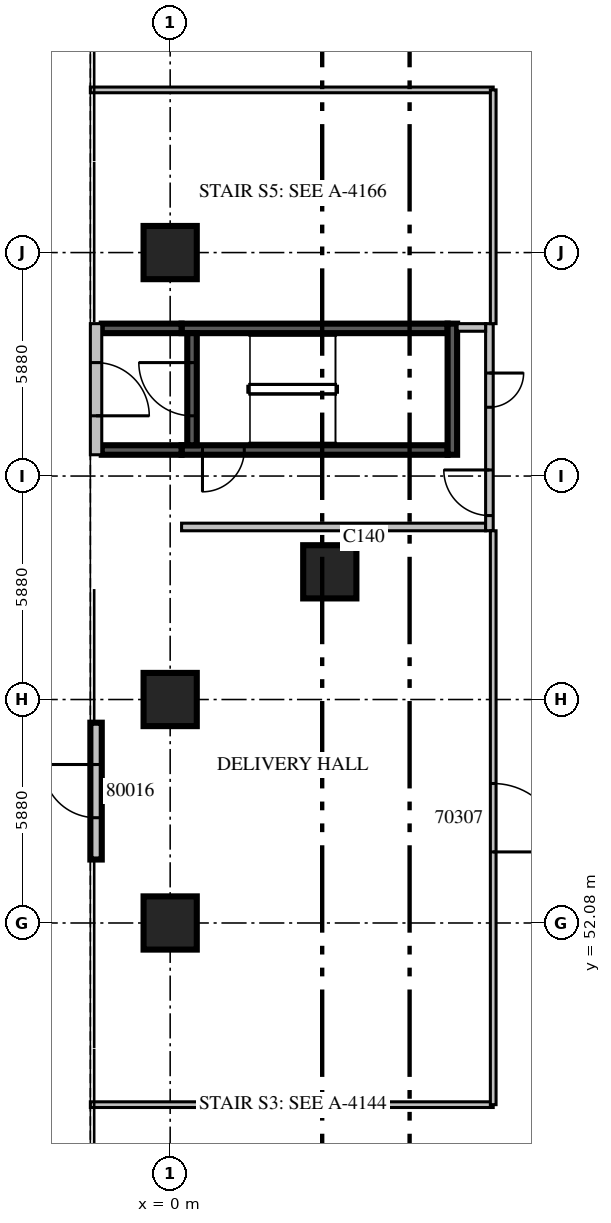
"""IFC4 building model, lengths in metres.
Left out: names, types, materials, properties, quantities, classifications, styles, units other than length and angle.
Written with IfcOpenShell. Run it as: python <this file> out.ifc"""

import sys

from ifc_helpers import new_model, si_unit, direction, frame, frame_2d, origin, origin_2d, place, context, subcontext, project, spatial, rectangle, extrude, source, transform, mapped, element, fill, save


model = new_model("IFC4")
c1 = context("Model", 3, precision=1e-05, world=origin(), true_north=direction((0.0, 1.0)))
c2 = subcontext(c1, "Body", "Model", "MODEL_VIEW")
j1 = project(units=[si_unit("LENGTHUNIT", "METRE"), si_unit("PLANEANGLEUNIT", "RADIAN")], contexts=[c1])
p1 = place(None, origin())
s1 = spatial("IfcSite", under=j1, at=p1, CompositionType="ELEMENT")
p2 = place(p1, origin())
s2 = spatial("IfcBuilding", under=s1, at=p2, CompositionType="ELEMENT")
p3 = place(p2, origin())
s3 = spatial("IfcBuildingStorey", under=s2, at=p3, CompositionType="ELEMENT", Elevation=0.0)
m1 = source(origin(), c2, "Body", "SweptSolid", [
    extrude(rectangle(XDim=1.4, YDim=1.4, at=origin_2d()), origin(), (0.0, 0.0, 1.0), 7.5),
])
for number, where, z_axis, x_axis in (
    (1, (0.0, 52.08, 0.0), (0.0, 0.0, 1.0), (1.0, 0.0, 0.0)),
    (2, (0.0, 57.96, 0.0), (0.0, 0.0, 1.0), (1.0, 0.0, 0.0)),
    (3, (0.0, 69.72, 0.0), (0.0, 0.0, 1.0), (1.0, 0.0, 0.0)),
    (4, (4.2, 61.32, 0.0), (0.0, 0.0, 1.0), (1.0, 0.0, 0.0)),
):
    element("IfcColumn", number, at=place(p3, frame(where, z_axis=z_axis, x_axis=x_axis)), inside=s3, PredefinedType="COLUMN", context=c2, shape_type="MappedRepresentation", body=[
        mapped(m1, transform((0.0, 0.0, 0.0), scale=1.0)),
    ])
m2 = source(origin(), c2, "Body", "SweptSolid", [
    extrude(rectangle(XDim=3.6, YDim=0.3, at=frame_2d((1.8, 0.0))), origin(), (0.0, 0.0, 1.0), 6.9),
])
p4 = place(p3, frame((-1.95, 57.35, 0.0), z_axis=(0.0, 0.0, 1.0), x_axis=(0.0, -1.0, 0.0)))
e5 = element("IfcWall", 5, at=p4, inside=s3, PredefinedType="STANDARD", context=c2, shape_type="MappedRepresentation", body=[
    mapped(m2, transform((0.0, 0.0, 0.0), scale=1.0)),
])
m3 = source(origin(), c2, "Body", "SweptSolid", [
    extrude(rectangle(XDim=1.4, YDim=2.4, at=frame_2d((0.7, 1.2))), frame((0.0, 0.16, 0.0), z_axis=(0.0, -1.0, 0.0), x_axis=(1.0, 0.0, 0.0)), (0.0, 0.0, 1.0), 0.32),
])
p5 = place(p4, frame((1.1, 0.0, 0.0)))
e6 = element("IfcOpeningElement", 6, at=p5, cuts=e5, PredefinedType="OPENING", context=c2, shape_type="MappedRepresentation", body=[
    mapped(m3, transform((0.0, 0.0, 0.0), scale=1.0)),
])
m4 = source(origin(), c2, "Body", "SweptSolid", [
    extrude(rectangle(XDim=7.0, YDim=0.25, at=frame_2d((3.5, 0.0))), origin(), (0.0, 0.0, 1.0), 6.9),
])
p6 = place(p3, frame((0.3, 64.525, 0.0), z_axis=(0.0, 0.0, 1.0), x_axis=(1.0, 0.0, 0.0)))
e7 = element("IfcWall", 7, at=p6, inside=s3, PredefinedType="SOLIDWALL", context=c2, shape_type="MappedRepresentation", body=[
    mapped(m4, transform((0.0, 0.0, 0.0), scale=1.0)),
])
m5 = source(origin(), c2, "Body", "SweptSolid", [
    extrude(rectangle(XDim=1.1, YDim=2.1, at=frame_2d((0.55, 1.05))), frame((0.0, 0.135, 0.0), z_axis=(0.0, -1.0, 0.0), x_axis=(1.0, 0.0, 0.0)), (0.0, 0.0, 1.0), 0.27),
])
p7 = place(p6, frame((0.55, 0.0, 0.0)))
e8 = element("IfcOpeningElement", 8, at=p7, cuts=e7, PredefinedType="OPENING", context=c2, shape_type="MappedRepresentation", body=[
    mapped(m5, transform((0.0, 0.0, 0.0), scale=1.0)),
])
p8 = place(p3, frame((0.3, 67.725, 0.0), z_axis=(0.0, 0.0, 1.0), x_axis=(1.0, 0.0, 0.0)))
e9 = element("IfcWall", 9, at=p8, inside=s3, PredefinedType="SOLIDWALL", context=c2, shape_type="MappedRepresentation", body=[
    mapped(m4, transform((0.0, 0.0, 0.0), scale=1.0)),
])
m6 = source(origin(), c2, "Body", "SweptSolid", [
    extrude(rectangle(XDim=3.45, YDim=0.25, at=frame_2d((1.725, 0.0))), origin(), (0.0, 0.0, 1.0), 6.9),
])
p9 = place(p3, frame((7.425, 64.4, 0.0), z_axis=(0.0, 0.0, 1.0), x_axis=(0.0, 1.0, 0.0)))
e10 = element("IfcWall", 10, at=p9, inside=s3, PredefinedType="SOLIDWALL", context=c2, shape_type="MappedRepresentation", body=[
    mapped(m6, transform((0.0, 0.0, 0.0), scale=1.0)),
])
m7 = source(origin(), c2, "Body", "SweptSolid", [
    extrude(rectangle(XDim=2.95, YDim=0.25, at=frame_2d((1.475, 0.0))), origin(), (0.0, 0.0, 1.0), 6.9),
])
p10 = place(p3, frame((0.575, 67.6, 0.0), z_axis=(0.0, 0.0, 1.0), x_axis=(0.0, -1.0, 0.0)))
e11 = element("IfcWall", 11, at=p10, inside=s3, PredefinedType="SOLIDWALL", context=c2, shape_type="MappedRepresentation", body=[
    mapped(m7, transform((0.0, 0.0, 0.0), scale=1.0)),
])
m8 = source(origin(), c2, "Body", "SweptSolid", [
    extrude(rectangle(XDim=1.4, YDim=2.1, at=frame_2d((0.7, 1.05))), frame((0.0, 0.135, 0.0), z_axis=(0.0, -1.0, 0.0), x_axis=(1.0, 0.0, 0.0)), (0.0, 0.0, 1.0), 0.27),
])
p11 = place(p10, frame((0.775, 0.0, 0.0)))
e12 = element("IfcOpeningElement", 12, at=p11, cuts=e11, PredefinedType="OPENING", context=c2, shape_type="MappedRepresentation", body=[
    mapped(m8, transform((0.0, 0.0, 0.0), scale=1.0)),
])
m9 = source(origin(), c2, "Body", "SweptSolid", [
    extrude(rectangle(XDim=8.0, YDim=0.2, at=frame_2d((4.0, 0.0))), origin(), (0.0, 0.0, 1.0), 6.9),
])
p12 = place(p3, frame((0.3, 62.5, 0.0), z_axis=(0.0, 0.0, 1.0), x_axis=(1.0, 0.0, 0.0)))
e13 = element("IfcWall", 13, at=p12, inside=s3, PredefinedType="PARTITIONING", context=c2, shape_type="MappedRepresentation", body=[
    mapped(m9, transform((0.0, 0.0, 0.0), scale=1.0)),
])
m10 = source(origin(), c2, "Body", "SweptSolid", [
    extrude(rectangle(XDim=5.45, YDim=0.2, at=frame_2d((2.725, 0.0))), origin(), (0.0, 0.0, 1.0), 6.9),
])
p13 = place(p3, frame((8.4, 67.85, 0.0), z_axis=(0.0, 0.0, 1.0), x_axis=(0.0, -1.0, 0.0)))
e14 = element("IfcWall", 14, at=p13, inside=s3, PredefinedType="PARTITIONING", context=c2, shape_type="MappedRepresentation", body=[
    mapped(m10, transform((0.0, 0.0, 0.0), scale=1.0)),
])
m11 = source(origin(), c2, "Body", "SweptSolid", [
    extrude(rectangle(XDim=1.2, YDim=2.1, at=frame_2d((0.6, 1.05))), frame((0.0, 0.11, 0.0), z_axis=(0.0, -1.0, 0.0), x_axis=(1.0, 0.0, 0.0)), (0.0, 0.0, 1.0), 0.22),
])
p14 = place(p13, frame((3.85, 0.0, 0.0)))
e15 = element("IfcOpeningElement", 15, at=p14, cuts=e14, PredefinedType="OPENING", context=c2, shape_type="MappedRepresentation", body=[
    mapped(m11, transform((0.0, 0.0, 0.0), scale=1.0)),
])
m12 = source(origin(), c2, "Body", "SweptSolid", [
    extrude(rectangle(XDim=0.9, YDim=2.1, at=frame_2d((0.45, 1.05))), frame((0.0, 0.11, 0.0), z_axis=(0.0, -1.0, 0.0), x_axis=(1.0, 0.0, 0.0)), (0.0, 0.0, 1.0), 0.22),
])
p15 = place(p13, frame((1.3, 0.0, 0.0)))
e16 = element("IfcOpeningElement", 16, at=p15, cuts=e14, PredefinedType="OPENING", context=c2, shape_type="MappedRepresentation", body=[
    mapped(m12, transform((0.0, 0.0, 0.0), scale=1.0)),
])
m13 = source(origin(), c2, "Body", "SweptSolid", [
    extrude(rectangle(XDim=0.75, YDim=0.2, at=frame_2d((0.375, 0.0))), origin(), (0.0, 0.0, 1.0), 6.9),
])
p16 = place(p3, frame((7.55, 67.75, 0.0), z_axis=(0.0, 0.0, 1.0), x_axis=(1.0, 0.0, 0.0)))
e17 = element("IfcWall", 17, at=p16, inside=s3, PredefinedType="PARTITIONING", context=c2, shape_type="MappedRepresentation", body=[
    mapped(m13, transform((0.0, 0.0, 0.0), scale=1.0)),
])
m14 = source(origin(), c2, "Body", "SweptSolid", [
    extrude(rectangle(XDim=2.1, YDim=0.25, at=frame_2d((1.05, 0.0))), origin(), (0.0, 0.0, 1.0), 6.9),
])
for number, where, z_axis, x_axis in (
    (18, (-1.8, 64.525, 0.0), (0.0, 0.0, 1.0), (1.0, 0.0, 0.0)),
    (19, (-1.8, 67.725, 0.0), (0.0, 0.0, 1.0), (1.0, 0.0, 0.0)),
):
    element("IfcWall", number, at=place(p3, frame(where, z_axis=z_axis, x_axis=x_axis)), inside=s3, PredefinedType="SOLIDWALL", context=c2, shape_type="MappedRepresentation", body=[
        mapped(m14, transform((0.0, 0.0, 0.0), scale=1.0)),
    ])
m15 = source(origin(), c2, "Body", "SweptSolid", [
    extrude(rectangle(XDim=3.45, YDim=0.3, at=frame_2d((1.725, 0.0))), origin(), (0.0, 0.0, 1.0), 6.9),
])
p17 = place(p3, frame((-1.95, 64.4, 0.0), z_axis=(0.0, 0.0, 1.0), x_axis=(0.0, 1.0, 0.0)))
e20 = element("IfcWall", 20, at=p17, inside=s3, PredefinedType="PARTITIONING", context=c2, shape_type="MappedRepresentation", body=[
    mapped(m15, transform((0.0, 0.0, 0.0), scale=1.0)),
])
m16 = source(origin(), c2, "Body", "SweptSolid", [
    extrude(rectangle(XDim=1.4, YDim=2.1, at=frame_2d((0.7, 1.05))), frame((0.0, 0.16, 0.0), z_axis=(0.0, -1.0, 0.0), x_axis=(1.0, 0.0, 0.0)), (0.0, 0.0, 1.0), 0.32),
])
p18 = place(p17, frame((1.025, 0.0, 0.0)))
e21 = element("IfcOpeningElement", 21, at=p18, cuts=e20, PredefinedType="OPENING", context=c2, shape_type="MappedRepresentation", body=[
    mapped(m16, transform((0.0, 0.0, 0.0), scale=1.0)),
])
p19 = place(p3, frame((-2.1, 47.3, 0.0), z_axis=(0.0, 0.0, 1.0), x_axis=(1.0, 0.0, 0.0)))
e22 = element("IfcWall", 22, at=p19, inside=s3, PredefinedType="PARTITIONING", context=c2, shape_type="SweptSolid", body=[
    extrude(rectangle(XDim=10.6, YDim=0.15, at=frame_2d((5.3, 0.0))), origin(), (0.0, 0.0, 1.0), 6.9),
])
m17 = source(origin(), c2, "Body", "SweptSolid", [
    extrude(rectangle(XDim=10.6, YDim=0.15, at=frame_2d((5.3, 0.0))), origin(), (0.0, 0.0, 1.0), 6.9),
])
p20 = place(p3, frame((-2.1, 74.0, 0.0), z_axis=(0.0, 0.0, 1.0), x_axis=(1.0, 0.0, 0.0)))
e23 = element("IfcWall", 23, at=p20, inside=s3, PredefinedType="PARTITIONING", context=c2, shape_type="MappedRepresentation", body=[
    mapped(m17, transform((0.0, 0.0, 0.0), scale=1.0)),
])
p21 = place(p3, frame((8.5, 47.3, 0.0), z_axis=(0.0, 0.0, 1.0), x_axis=(0.0, 1.0, 0.0)))
e24 = element("IfcWall", 24, at=p21, inside=s3, PredefinedType="PARTITIONING", context=c2, shape_type="SweptSolid", body=[
    extrude(rectangle(XDim=15.1, YDim=0.15, at=frame_2d((7.55, 0.0))), origin(), (0.0, 0.0, 1.0), 6.9),
])
m18 = source(origin(), c2, "Body", "SweptSolid", [
    extrude(rectangle(XDim=1.8, YDim=2.1, at=frame_2d((0.9, 1.05))), frame((0.0, 0.085, 0.0), z_axis=(0.0, -1.0, 0.0), x_axis=(1.0, 0.0, 0.0)), (0.0, 0.0, 1.0), 0.17),
])
p22 = place(p21, frame((6.65, 0.0, 0.0)))
e25 = element("IfcOpeningElement", 25, at=p22, cuts=e24, PredefinedType="OPENING", context=c2, shape_type="MappedRepresentation", body=[
    mapped(m18, transform((0.0, 0.0, 0.0), scale=1.0)),
])
p23 = place(p3, frame((8.5, 67.85, 0.0), z_axis=(0.0, 0.0, 1.0), x_axis=(0.0, 1.0, 0.0)))
e26 = element("IfcWall", 26, at=p23, inside=s3, PredefinedType="PARTITIONING", context=c2, shape_type="SweptSolid", body=[
    extrude(rectangle(XDim=6.15, YDim=0.15, at=frame_2d((3.075, 0.0))), origin(), (0.0, 0.0, 1.0), 6.9),
])
m19 = source(origin(), c2, "Body", "SweptSolid", [
    extrude(rectangle(XDim=1.4, YDim=2.4, at=frame_2d((0.7, 1.2))), frame((0.0, 0.025, 0.0), z_axis=(0.0, -1.0, 0.0), x_axis=(1.0, 0.0, 0.0)), (0.0, 0.0, 1.0), 0.05),
])
p24 = place(p5, origin())
e27 = element("IfcDoor", 27, at=p24, inside=s3, OperationType="DOUBLE_DOOR_SINGLE_SWING", PredefinedType="DOOR", context=c2, shape_type="MappedRepresentation", body=[
    mapped(m19, transform((0.0, 0.0, 0.0), scale=1.0)),
])
fill(e6, e27)
m20 = source(origin(), c2, "Body", "SweptSolid", [
    extrude(rectangle(XDim=1.1, YDim=2.1, at=frame_2d((0.55, 1.05))), frame((0.0, 0.025, 0.0), z_axis=(0.0, -1.0, 0.0), x_axis=(1.0, 0.0, 0.0)), (0.0, 0.0, 1.0), 0.05),
])
p25 = place(p7, origin())
e28 = element("IfcDoor", 28, at=p25, inside=s3, OperationType="SINGLE_SWING_RIGHT", PredefinedType="DOOR", context=c2, shape_type="MappedRepresentation", body=[
    mapped(m20, transform((0.0, 0.0, 0.0), scale=1.0)),
])
fill(e8, e28)
m21 = source(origin(), c2, "Body", "SweptSolid", [
    extrude(rectangle(XDim=1.4, YDim=2.1, at=frame_2d((0.7, 1.05))), frame((0.0, 0.025, 0.0), z_axis=(0.0, -1.0, 0.0), x_axis=(1.0, 0.0, 0.0)), (0.0, 0.0, 1.0), 0.05),
])
p26 = place(p11, origin())
e29 = element("IfcDoor", 29, at=p26, inside=s3, OperationType="DOUBLE_DOOR_SINGLE_SWING", PredefinedType="DOOR", context=c2, shape_type="MappedRepresentation", body=[
    mapped(m21, transform((0.0, 0.0, 0.0), scale=1.0)),
])
fill(e12, e29)
m22 = source(origin(), c2, "Body", "SweptSolid", [
    extrude(rectangle(XDim=1.2, YDim=2.1, at=frame_2d((0.6, 1.05))), frame((0.0, 0.025, 0.0), z_axis=(0.0, -1.0, 0.0), x_axis=(1.0, 0.0, 0.0)), (0.0, 0.0, 1.0), 0.05),
])
p27 = place(p14, origin())
e30 = element("IfcDoor", 30, at=p27, inside=s3, OperationType="SINGLE_SWING_RIGHT", PredefinedType="DOOR", context=c2, shape_type="MappedRepresentation", body=[
    mapped(m22, transform((0.0, 0.0, 0.0), scale=1.0)),
])
fill(e15, e30)
m23 = source(origin(), c2, "Body", "SweptSolid", [
    extrude(rectangle(XDim=0.9, YDim=2.1, at=frame_2d((0.45, 1.05))), frame((0.0, 0.025, 0.0), z_axis=(0.0, -1.0, 0.0), x_axis=(1.0, 0.0, 0.0)), (0.0, 0.0, 1.0), 0.05),
])
p28 = place(p15, origin())
e31 = element("IfcDoor", 31, at=p28, inside=s3, OperationType="SINGLE_SWING_LEFT", PredefinedType="DOOR", context=c2, shape_type="MappedRepresentation", body=[
    mapped(m23, transform((0.0, 0.0, 0.0), scale=1.0)),
])
fill(e16, e31)
p29 = place(p18, origin())
e32 = element("IfcDoor", 32, at=p29, inside=s3, OperationType="DOUBLE_DOOR_SINGLE_SWING", PredefinedType="DOOR", context=c2, shape_type="MappedRepresentation", body=[
    mapped(m21, transform((0.0, 0.0, 0.0), scale=1.0)),
])
fill(e21, e32)
m24 = source(origin(), c2, "Body", "SweptSolid", [
    extrude(rectangle(XDim=1.8, YDim=2.1, at=frame_2d((0.9, 1.05))), frame((0.0, 0.025, 0.0), z_axis=(0.0, -1.0, 0.0), x_axis=(1.0, 0.0, 0.0)), (0.0, 0.0, 1.0), 0.05),
])
p30 = place(p22, origin())
e33 = element("IfcDoor", 33, at=p30, inside=s3, OperationType="DOUBLE_DOOR_SINGLE_SWING", PredefinedType="DOOR", context=c2, shape_type="MappedRepresentation", body=[
    mapped(m24, transform((0.0, 0.0, 0.0), scale=1.0)),
])
fill(e25, e33)
save(model, sys.argv[1])
